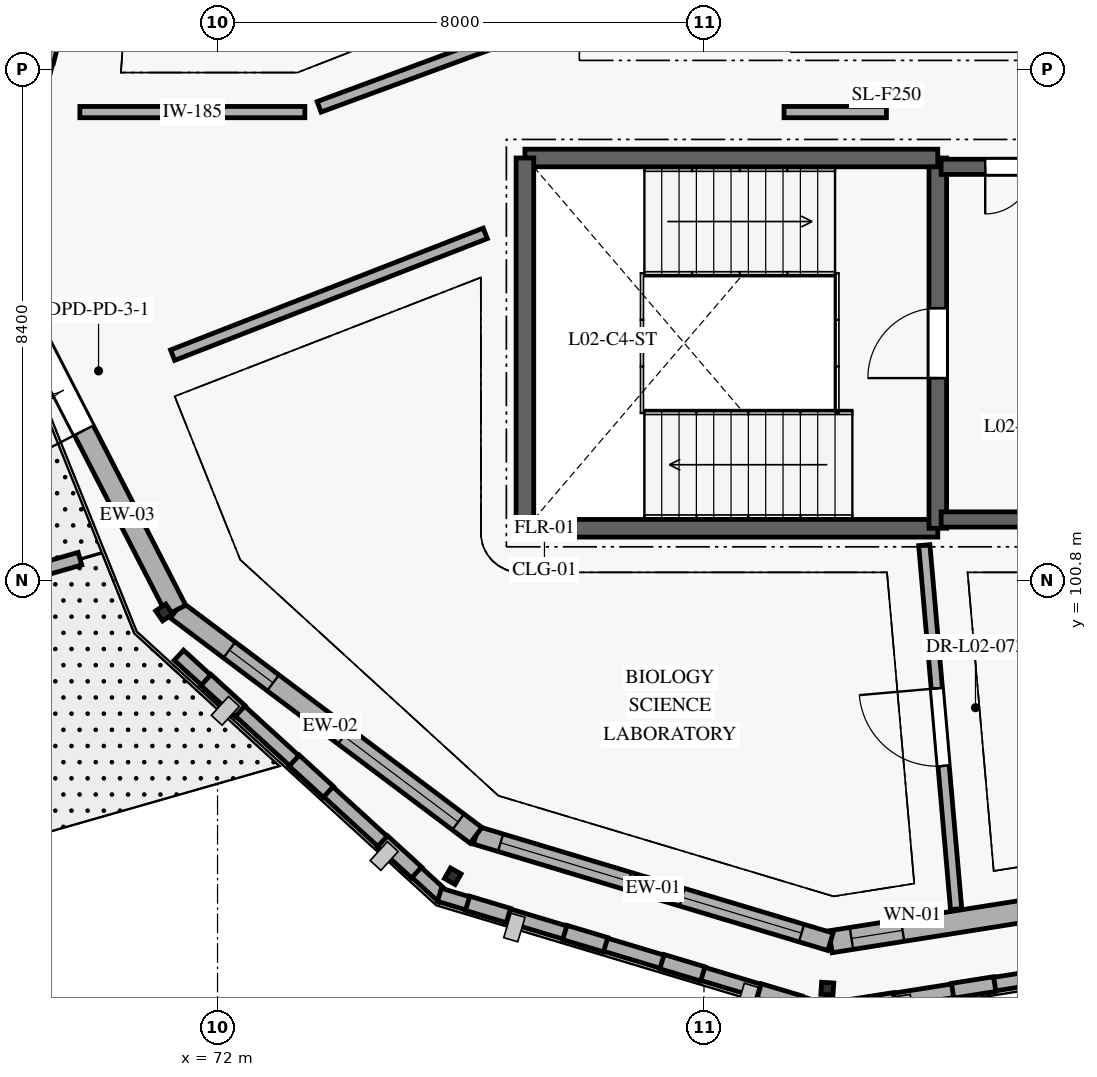
"""IFC4 building model, lengths in metres.
Left out: names, types, materials, properties, quantities, classifications, styles, units other than length and angle.
Written with IfcOpenShell. Run it as: python <this file> out.ifc"""

import sys

from ifc_helpers import new_model, si_unit, direction, frame, frame_2d, origin, origin_2d, place, context, subcontext, project, spatial, rectangle, hollow_rectangle, extrude, element, fill, save


model = new_model("IFC4")
c1 = context("Model", 3, precision=1e-05, world=origin(), true_north=direction((0.0, 1.0)))
c2 = subcontext(c1, "Body", "Model", "MODEL_VIEW")
j1 = project(units=[si_unit("LENGTHUNIT", "METRE"), si_unit("PLANEANGLEUNIT", "RADIAN")], contexts=[c1])
p1 = place(None, origin())
s1 = spatial("IfcSite", under=j1, at=p1, CompositionType="ELEMENT")
p2 = place(p1, origin())
s2 = spatial("IfcBuilding", under=s1, at=p2, CompositionType="ELEMENT")
p3 = place(p2, frame((0.0, 0.0, 8.4)))
s3 = spatial("IfcBuildingStorey", under=s2, at=p3, CompositionType="ELEMENT", Elevation=8.4)
for number, where, z_axis, x_axis in (
    (1, (71.122, 100.271, 0.0), (0.0, 0.0, 1.0), (0.569, -0.822, 0.0)),
    (2, (75.869, 95.932, 0.0), (0.0, 0.0, 1.0), (0.87, -0.493, 0.0)),
    (3, (82.028, 94.083, 0.0), (0.0, 0.0, 1.0), (0.998, -0.067, 0.0)),
):
    element("IfcColumn", number, at=place(p3, frame(where, z_axis=z_axis, x_axis=x_axis)), inside=s3, PredefinedType="COLUMN", context=c2, shape_type="SweptSolid", body=[
        extrude(hollow_rectangle(XDim=0.2, YDim=0.2, WallThickness=0.012, InnerFilletRadius=0.012, OuterFilletRadius=0.019, at=origin_2d()), origin(), (0.0, 0.0, 1.0), 4.2),
    ])
p4 = place(p3, frame((88.092, 95.806, 0.0), z_axis=(0.0, 0.0, 1.0), x_axis=(-0.987690665759, -0.156419783824, 0.0)))
e4 = element("IfcWall", 4, at=p4, inside=s3, PredefinedType="SOLIDWALL", context=c2, shape_type="SweptSolid", body=[
    extrude(rectangle(XDim=6.087, YDim=0.365, at=frame_2d((3.043, 0.0))), origin(), (0.0, 0.0, 1.0), 3.94),
])
p5 = place(p4, frame((0.647, 0.0, 0.85)))
e5 = element("IfcOpeningElement", 5, at=p5, cuts=e4, PredefinedType="OPENING", context=c2, shape_type="SweptSolid", body=[
    extrude(rectangle(XDim=1.75, YDim=1.8, at=frame_2d((0.875, 0.9))), frame((0.0, 0.192, 0.0), z_axis=(0.0, -1.0, 0.0), x_axis=(1.0, 0.0, 0.0)), (0.0, 0.0, 1.0), 0.385),
])
p6 = place(p4, frame((4.887, 0.0, 0.85)))
e6 = element("IfcOpeningElement", 6, at=p6, cuts=e4, PredefinedType="OPENING", context=c2, shape_type="SweptSolid", body=[
    extrude(rectangle(XDim=0.85, YDim=1.4, at=frame_2d((0.425, 0.7))), frame((0.0, 0.192, 0.0), z_axis=(0.0, -1.0, 0.0), x_axis=(1.0, 0.0, 0.0)), (0.0, 0.0, 1.0), 0.385),
])
p7 = place(p3, frame((82.08, 94.854, 0.0), z_axis=(0.0, 0.0, 1.0), x_axis=(-0.957750075894, 0.28760179437, 0.0)))
e7 = element("IfcWall", 7, at=p7, inside=s3, PredefinedType="SOLIDWALL", context=c2, shape_type="SweptSolid", body=[
    extrude(rectangle(XDim=6.086, YDim=0.3, at=frame_2d((3.043, 0.0))), origin(), (0.0, 0.0, 1.0), 3.94),
])
p8 = place(p7, frame((0.497, 0.0, 0.85)))
e8 = element("IfcOpeningElement", 8, at=p8, cuts=e7, PredefinedType="OPENING", context=c2, shape_type="SweptSolid", body=[
    extrude(rectangle(XDim=2.05, YDim=1.8, at=frame_2d((1.025, 0.9))), frame((0.0, 0.16, 0.0), z_axis=(0.0, -1.0, 0.0), x_axis=(1.0, 0.0, 0.0)), (0.0, 0.0, 1.0), 0.32),
])
p9 = place(p7, frame((3.465, 0.0, 0.85)))
e9 = element("IfcOpeningElement", 9, at=p9, cuts=e7, PredefinedType="OPENING", context=c2, shape_type="SweptSolid", body=[
    extrude(rectangle(XDim=2.2, YDim=1.8, at=frame_2d((1.1, 0.9))), frame((0.0, 0.16, 0.0), z_axis=(0.0, -1.0, 0.0), x_axis=(1.0, 0.0, 0.0)), (0.0, 0.0, 1.0), 0.32),
])
p10 = place(p3, frame((76.25, 96.604, 0.0), z_axis=(0.0, 0.0, 1.0), x_axis=(-0.799381925895, 0.600823215723, 0.0)))
e10 = element("IfcWall", 10, at=p10, inside=s3, PredefinedType="SOLIDWALL", context=c2, shape_type="SweptSolid", body=[
    extrude(rectangle(XDim=6.166, YDim=0.325, at=frame_2d((3.083, 0.0))), origin(), (0.0, 0.0, 1.0), 3.642),
])
p11 = place(p10, frame((0.366, 0.0, 0.85)))
e11 = element("IfcOpeningElement", 11, at=p11, cuts=e10, PredefinedType="OPENING", context=c2, shape_type="SweptSolid", body=[
    extrude(rectangle(XDim=2.35, YDim=1.8, at=frame_2d((1.175, 0.9))), frame((0.0, 0.172, 0.0), z_axis=(0.0, -1.0, 0.0), x_axis=(1.0, 0.0, 0.0)), (0.0, 0.0, 1.0), 0.345),
])
p12 = place(p10, frame((4.175, 0.0, 0.85)))
e12 = element("IfcOpeningElement", 12, at=p12, cuts=e10, PredefinedType="OPENING", context=c2, shape_type="SweptSolid", body=[
    extrude(rectangle(XDim=0.9, YDim=1.6, at=frame_2d((0.45, 0.8))), frame((0.0, 0.172, 0.0), z_axis=(0.0, -1.0, 0.0), x_axis=(1.0, 0.0, 0.0)), (0.0, 0.0, 1.0), 0.345),
])
p13 = place(p3, frame((71.321, 100.309, 0.0), z_axis=(0.0, 0.0, 1.0), x_axis=(-0.457271873076, 0.889326955677, 0.0)))
e13 = element("IfcWall", 13, at=p13, inside=s3, PredefinedType="SOLIDWALL", context=c2, shape_type="SweptSolid", body=[
    extrude(rectangle(XDim=6.593, YDim=0.35, at=frame_2d((3.297, 0.0))), origin(), (0.0, 0.0, 1.0), 3.642),
])
p14 = place(p13, frame((3.324, 0.0, 0.0)))
e14 = element("IfcOpeningElement", 14, at=p14, cuts=e13, PredefinedType="OPENING", context=c2, shape_type="SweptSolid", body=[
    extrude(rectangle(XDim=1.48, YDim=2.12, at=frame_2d((0.74, 1.06))), frame((0.0, 0.185, 0.0), z_axis=(0.0, -1.0, 0.0), x_axis=(1.0, 0.0, 0.0)), (0.0, 0.0, 1.0), 0.37),
])
p15 = place(p3, frame((68.306, 106.173, 0.0), z_axis=(0.0, 0.0, 1.0), x_axis=(0.244394694827, 0.969675839206, 0.0)))
e15 = element("IfcWall", 15, at=p15, inside=s3, PredefinedType="SOLIDWALL", context=c2, shape_type="SweptSolid", body=[
    extrude(rectangle(XDim=3.275, YDim=0.38, at=frame_2d((1.637, 0.0))), origin(), (0.0, 0.0, 1.0), 3.642),
])
p16 = place(p15, frame((1.187, 0.0, 0.85)))
e16 = element("IfcOpeningElement", 16, at=p16, cuts=e15, PredefinedType="OPENING", context=c2, shape_type="SweptSolid", body=[
    extrude(rectangle(XDim=0.9, YDim=1.6, at=frame_2d((0.45, 0.8))), frame((0.0, 0.2, 0.0), z_axis=(0.0, -1.0, 0.0), x_axis=(1.0, 0.0, 0.0)), (0.0, 0.0, 1.0), 0.4),
])
p17 = place(p3, frame((69.107, 109.348, 0.0), z_axis=(0.0, 0.0, 1.0), x_axis=(0.249291589469, 0.968428470988, 0.0)))
e17 = element("IfcWall", 17, at=p17, inside=s3, PredefinedType="SOLIDWALL", context=c2, shape_type="SweptSolid", body=[
    extrude(rectangle(XDim=3.186, YDim=0.4, at=frame_2d((1.593, 0.0))), origin(), (0.0, 0.0, 1.0), 3.642),
])
p18 = place(p17, frame((0.993, 0.0, 0.85)))
e18 = element("IfcOpeningElement", 18, at=p18, cuts=e17, PredefinedType="OPENING", context=c2, shape_type="SweptSolid", body=[
    extrude(rectangle(XDim=1.2, YDim=1.15, at=frame_2d((0.6, 0.575))), frame((0.0, 0.21, 0.0), z_axis=(0.0, -1.0, 0.0), x_axis=(1.0, 0.0, 0.0)), (0.0, 0.0, 1.0), 0.42),
])
p19 = place(p3, frame((71.365, 99.567, 0.0), z_axis=(0.0, 0.0, 1.0), x_axis=(0.738118906404, -0.674670645581, 0.0)))
e19 = element("IfcWall", 19, at=p19, inside=s3, PredefinedType="ELEMENTEDWALL", context=c2, shape_type="SweptSolid", body=[
    extrude(rectangle(XDim=5.899, YDim=0.225, at=frame_2d((2.949, 0.0))), origin(), (0.0, 0.0, 1.0), 1.09),
])
for number, where, z_axis, x_axis in (
    (20, (71.81, 99.16, 1.09), (0.0, 0.0, 1.0), (0.738, -0.675, 0.0)),
    (21, (73.261, 97.833, 1.09), (0.0, 0.0, 1.0), (0.738, -0.675, 0.0)),
):
    element("IfcWall", number, at=place(p3, frame(where, z_axis=z_axis, x_axis=x_axis)), inside=s3, PredefinedType="ELEMENTEDWALL", context=c2, shape_type="SweptSolid", body=[
        extrude(rectangle(XDim=0.76, YDim=0.245, at=frame_2d((0.38, 0.0))), origin(), (0.0, 0.0, 1.0), 2.85),
    ])
p20 = place(p3, frame((74.713, 96.507, 1.09), z_axis=(0.0, 0.0, 1.0), x_axis=(0.738033381673, -0.674764201434, 0.0)))
e22 = element("IfcWall", 22, at=p20, inside=s3, PredefinedType="ELEMENTEDWALL", context=c2, shape_type="SweptSolid", body=[
    extrude(rectangle(XDim=0.76, YDim=0.245, at=frame_2d((0.38, 0.0))), origin(), (0.0, 0.0, 1.0), 2.85),
])
p21 = place(p3, frame((75.649, 95.626, 0.0), z_axis=(0.0, 0.0, 1.0), x_axis=(0.957749751871, -0.287602873404, 0.0)))
e23 = element("IfcWall", 23, at=p21, inside=s3, PredefinedType="ELEMENTEDWALL", context=c2, shape_type="SweptSolid", body=[
    extrude(rectangle(XDim=6.676, YDim=0.225, at=frame_2d((3.338, 0.0))), origin(), (0.0, 0.0, 1.0), 1.09),
])
for number, where, z_axis, x_axis in (
    (24, (76.113, 95.487, 1.09), (0.0, 0.0, 1.0), (0.958, -0.288, 0.0)),
    (25, (77.711, 95.007, 1.09), (0.0, 0.0, 1.0), (0.958, -0.288, 0.0)),
    (26, (79.31, 94.527, 1.09), (0.0, 0.0, 1.0), (0.958, -0.287, 0.0)),
    (27, (80.908, 94.047, 1.09), (0.0, 0.0, 1.0), (0.958, -0.287, 0.0)),
):
    element("IfcWall", number, at=place(p3, frame(where, z_axis=z_axis, x_axis=x_axis)), inside=s3, PredefinedType="ELEMENTEDWALL", context=c2, shape_type="SweptSolid", body=[
        extrude(rectangle(XDim=0.701, YDim=0.245, at=frame_2d((0.351, 0.0))), origin(), (0.0, 0.0, 1.0), 2.85),
    ])
p22 = place(p3, frame((81.963, 93.712, 0.0), z_axis=(0.0, 0.0, 1.0), x_axis=(0.987690206406, 0.156422684322, 0.0)))
e28 = element("IfcWall", 28, at=p22, inside=s3, PredefinedType="ELEMENTEDWALL", context=c2, shape_type="SweptSolid", body=[
    extrude(rectangle(XDim=6.676, YDim=0.225, at=frame_2d((3.338, 0.0))), origin(), (0.0, 0.0, 1.0), 1.09),
])
for number, where, z_axis, x_axis in (
    (29, (82.441, 93.788, 1.09), (0.0, 0.0, 1.0), (0.988, 0.156, 0.0)),
    (30, (84.089, 94.049, 1.09), (0.0, 0.0, 1.0), (0.988, 0.156, 0.0)),
):
    element("IfcWall", number, at=place(p3, frame(where, z_axis=z_axis, x_axis=x_axis)), inside=s3, PredefinedType="ELEMENTEDWALL", context=c2, shape_type="SweptSolid", body=[
        extrude(rectangle(XDim=0.701, YDim=0.245, at=frame_2d((0.351, 0.0))), origin(), (0.0, 0.0, 1.0), 2.85),
    ])
p23 = place(p3, frame((52.938, 96.332, 0.0), z_axis=(0.0, 0.0, 1.0), x_axis=(0.961171570916, 0.275951465411, 0.0)))
e31 = element("IfcWall", 31, at=p23, inside=s3, PredefinedType="PARAPET", context=c2, shape_type="SweptSolid", body=[
    extrude(rectangle(XDim=17.478, YDim=0.215, at=frame_2d((8.739, 0.0))), origin(), (0.0, 0.0, 1.0), 1.15),
])
p24 = place(p3, frame((77.055, 101.655, 0.0), z_axis=(0.0, 0.0, 1.0), x_axis=(1.0, 0.0, 0.0)))
e32 = element("IfcWall", 32, at=p24, inside=s3, PredefinedType="SHEAR", context=c2, shape_type="SweptSolid", body=[
    extrude(rectangle(XDim=6.79, YDim=0.29, at=frame_2d((3.395, 0.0))), origin(), (0.0, 0.0, 1.0), 3.95),
])
p25 = place(p3, frame((83.845, 101.655, 0.0), z_axis=(0.0, 0.0, 1.0), x_axis=(0.0, 1.0, 0.0)))
e33 = element("IfcWall", 33, at=p25, inside=s3, PredefinedType="SHEAR", context=c2, shape_type="SweptSolid", body=[
    extrude(rectangle(XDim=6.09, YDim=0.29, at=frame_2d((3.045, 0.0))), origin(), (0.0, 0.0, 1.0), 3.95),
])
p26 = place(p25, frame((2.47, 0.0, 0.0)))
e34 = element("IfcOpeningElement", 34, at=p26, cuts=e33, PredefinedType="OPENING", context=c2, shape_type="SweptSolid", body=[
    extrude(rectangle(XDim=1.15, YDim=2.1, at=frame_2d((0.575, 1.05))), frame((0.0, 0.155, 0.0), z_axis=(0.0, -1.0, 0.0), x_axis=(1.0, 0.0, 0.0)), (0.0, 0.0, 1.0), 0.31),
])
p27 = place(p3, frame((83.845, 107.745, 0.0), z_axis=(0.0, 0.0, 1.0), x_axis=(-1.0, 0.0, 0.0)))
e35 = element("IfcWall", 35, at=p27, inside=s3, PredefinedType="SHEAR", context=c2, shape_type="SweptSolid", body=[
    extrude(rectangle(XDim=6.79, YDim=0.29, at=frame_2d((3.395, 0.0))), origin(), (0.0, 0.0, 1.0), 3.95),
])
p28 = place(p3, frame((77.055, 107.745, 0.0), z_axis=(0.0, 0.0, 1.0), x_axis=(0.0, -1.0, 0.0)))
e36 = element("IfcWall", 36, at=p28, inside=s3, PredefinedType="SHEAR", context=c2, shape_type="SweptSolid", body=[
    extrude(rectangle(XDim=6.09, YDim=0.29, at=frame_2d((3.045, 0.0))), origin(), (0.0, 0.0, 1.0), 3.95),
])
p29 = place(p3, frame((83.9, 101.8, 0.0), z_axis=(0.0, 0.0, 1.0), x_axis=(1.0, 0.0, 0.0)))
e37 = element("IfcWall", 37, at=p29, inside=s3, PredefinedType="SHEAR", context=c2, shape_type="SweptSolid", body=[
    extrude(rectangle(XDim=3.0, YDim=0.25, at=frame_2d((1.5, 0.0))), origin(), (0.0, 0.0, 1.0), 3.95),
])
p30 = place(p3, frame((86.9, 107.6, 0.0), z_axis=(0.0, 0.0, 1.0), x_axis=(-1.0, 0.0, 0.0)))
e38 = element("IfcWall", 38, at=p30, inside=s3, PredefinedType="SHEAR", context=c2, shape_type="SweptSolid", body=[
    extrude(rectangle(XDim=3.0, YDim=0.25, at=frame_2d((1.5, 0.0))), origin(), (0.0, 0.0, 1.0), 3.95),
])
p31 = place(p30, frame((0.725, 0.0, 0.0)))
e39 = element("IfcOpeningElement", 39, at=p31, cuts=e38, PredefinedType="OPENING", context=c2, shape_type="SweptSolid", body=[
    extrude(rectangle(XDim=1.55, YDim=2.15, at=frame_2d((0.775, 1.075))), frame((0.0, 0.135, 0.0), z_axis=(0.0, -1.0, 0.0), x_axis=(1.0, 0.0, 0.0)), (0.0, 0.0, 1.0), 0.27),
])
p32 = place(p3, frame((81.317, 108.5, 0.0), z_axis=(0.0, 0.0, 1.0), x_axis=(1.0, 0.0, 0.0)))
e40 = element("IfcWall", 40, at=p32, inside=s3, PredefinedType="PARTITIONING", context=c2, shape_type="SweptSolid", body=[
    extrude(rectangle(XDim=1.683, YDim=0.185, at=frame_2d((0.842, 0.0))), origin(), (0.0, 0.0, 1.0), 3.94),
])
p33 = place(p3, frame((69.736, 108.5, 0.0), z_axis=(0.0, 0.0, 1.0), x_axis=(1.0, 0.0, 0.0)))
e41 = element("IfcWall", 41, at=p33, inside=s3, PredefinedType="PARTITIONING", context=c2, shape_type="SweptSolid", body=[
    extrude(rectangle(XDim=3.7, YDim=0.185, at=frame_2d((1.85, 0.0))), origin(), (0.0, 0.0, 1.0), 3.94),
])
p34 = place(p3, frame((73.67, 108.586, 0.0), z_axis=(0.0, 0.0, 1.0), x_axis=(0.938293786345, 0.345839226384, 0.0)))
e42 = element("IfcWall", 42, at=p34, inside=s3, PredefinedType="PARTITIONING", context=c2, shape_type="SweptSolid", body=[
    extrude(rectangle(XDim=3.888, YDim=0.185, at=frame_2d((1.944, 0.0))), origin(), (0.0, 0.0, 1.0), 3.94),
])
p35 = place(p3, frame((76.403, 106.505, 0.0), z_axis=(0.0, 0.0, 1.0), x_axis=(-0.931801101999, -0.362969291145, 0.0)))
e43 = element("IfcWall", 43, at=p35, inside=s3, PredefinedType="PARTITIONING", context=c2, shape_type="SweptSolid", body=[
    extrude(rectangle(XDim=5.518, YDim=0.185, at=frame_2d((2.759, 0.0))), origin(), (0.0, 0.0, 1.0), 3.94),
])
p36 = place(p3, frame((84.147, 95.392, 0.0), z_axis=(0.0, 0.0, 1.0), x_axis=(-0.087194167802, 0.996191335588, 0.0)))
e44 = element("IfcWall", 44, at=p36, inside=s3, PredefinedType="PARTITIONING", context=c2, shape_type="SweptSolid", body=[
    extrude(rectangle(XDim=6.009, YDim=0.185, at=frame_2d((3.004, 0.0))), origin(), (0.0, 0.0, 1.0), 3.94),
])
p37 = place(p36, frame((2.365, 0.0, 0.0)))
e45 = element("IfcOpeningElement", 45, at=p37, cuts=e44, PredefinedType="OPENING", context=c2, shape_type="SweptSolid", body=[
    extrude(rectangle(XDim=1.28, YDim=2.14, at=frame_2d((0.64, 1.07))), frame((0.0, 0.103, 0.0), z_axis=(0.0, -1.0, 0.0), x_axis=(1.0, 0.0, 0.0)), (0.0, 0.0, 1.0), 0.205),
])
p38 = place(p14, origin())
e46 = element("IfcDoor", 46, at=p38, inside=s3, OperationType="DOUBLE_DOOR_SINGLE_SWING", PredefinedType="DOOR", context=c2, shape_type="SweptSolid", body=[
    extrude(rectangle(XDim=1.48, YDim=2.12, at=frame_2d((0.74, 1.06))), frame((0.0, 0.025, 0.0), z_axis=(0.0, -1.0, 0.0), x_axis=(1.0, 0.0, 0.0)), (0.0, 0.0, 1.0), 0.05),
])
fill(e14, e46)
p39 = place(p6, origin())
e47 = element("IfcWindow", 47, at=p39, inside=s3, PartitioningType="SINGLE_PANEL", PredefinedType="WINDOW", context=c2, shape_type="SweptSolid", body=[
    extrude(rectangle(XDim=0.85, YDim=1.4, at=frame_2d((0.425, 0.7))), frame((0.0, 0.03, 0.0), z_axis=(0.0, -1.0, 0.0), x_axis=(1.0, 0.0, 0.0)), (0.0, 0.0, 1.0), 0.06),
])
fill(e6, e47)
p40 = place(p8, origin())
e48 = element("IfcWindow", 48, at=p40, inside=s3, PartitioningType="SINGLE_PANEL", PredefinedType="WINDOW", context=c2, shape_type="SweptSolid", body=[
    extrude(rectangle(XDim=2.05, YDim=1.8, at=frame_2d((1.025, 0.9))), frame((0.0, 0.03, 0.0), z_axis=(0.0, -1.0, 0.0), x_axis=(1.0, 0.0, 0.0)), (0.0, 0.0, 1.0), 0.06),
])
fill(e8, e48)
p41 = place(p9, origin())
e49 = element("IfcWindow", 49, at=p41, inside=s3, PartitioningType="SINGLE_PANEL", PredefinedType="WINDOW", context=c2, shape_type="SweptSolid", body=[
    extrude(rectangle(XDim=2.2, YDim=1.8, at=frame_2d((1.1, 0.9))), frame((0.0, 0.03, 0.0), z_axis=(0.0, -1.0, 0.0), x_axis=(1.0, 0.0, 0.0)), (0.0, 0.0, 1.0), 0.06),
])
fill(e9, e49)
p42 = place(p11, origin())
e50 = element("IfcWindow", 50, at=p42, inside=s3, PartitioningType="SINGLE_PANEL", PredefinedType="WINDOW", context=c2, shape_type="SweptSolid", body=[
    extrude(rectangle(XDim=2.35, YDim=1.8, at=frame_2d((1.175, 0.9))), frame((0.0, 0.03, 0.0), z_axis=(0.0, -1.0, 0.0), x_axis=(1.0, 0.0, 0.0)), (0.0, 0.0, 1.0), 0.06),
])
fill(e11, e50)
p43 = place(p12, origin())
e51 = element("IfcWindow", 51, at=p43, inside=s3, PartitioningType="SINGLE_PANEL", PredefinedType="WINDOW", context=c2, shape_type="SweptSolid", body=[
    extrude(rectangle(XDim=0.9, YDim=1.6, at=frame_2d((0.45, 0.8))), frame((0.0, 0.03, 0.0), z_axis=(0.0, -1.0, 0.0), x_axis=(1.0, 0.0, 0.0)), (0.0, 0.0, 1.0), 0.06),
])
fill(e12, e51)
p44 = place(p26, origin())
e52 = element("IfcDoor", 52, at=p44, inside=s3, OperationType="SINGLE_SWING_LEFT", PredefinedType="DOOR", context=c2, shape_type="SweptSolid", body=[
    extrude(rectangle(XDim=1.15, YDim=2.1, at=frame_2d((0.575, 1.05))), frame((0.0, 0.025, 0.0), z_axis=(0.0, -1.0, 0.0), x_axis=(1.0, 0.0, 0.0)), (0.0, 0.0, 1.0), 0.05),
])
fill(e34, e52)
p45 = place(p31, origin())
e53 = element("IfcDoor", 53, at=p45, inside=s3, OperationType="DOUBLE_DOOR_SINGLE_SWING", PredefinedType="DOOR", context=c2, shape_type="SweptSolid", body=[
    extrude(rectangle(XDim=1.55, YDim=2.15, at=frame_2d((0.775, 1.075))), frame((0.0, 0.025, 0.0), z_axis=(0.0, -1.0, 0.0), x_axis=(1.0, 0.0, 0.0)), (0.0, 0.0, 1.0), 0.05),
])
fill(e39, e53)
p46 = place(p37, origin())
e54 = element("IfcDoor", 54, at=p46, inside=s3, OperationType="SINGLE_SWING_RIGHT", PredefinedType="DOOR", context=c2, shape_type="SweptSolid", body=[
    extrude(rectangle(XDim=1.28, YDim=2.14, at=frame_2d((0.64, 1.07))), frame((0.0, 0.025, 0.0), z_axis=(0.0, -1.0, 0.0), x_axis=(1.0, 0.0, 0.0)), (0.0, 0.0, 1.0), 0.05),
])
fill(e45, e54)
save(model, sys.argv[1])
